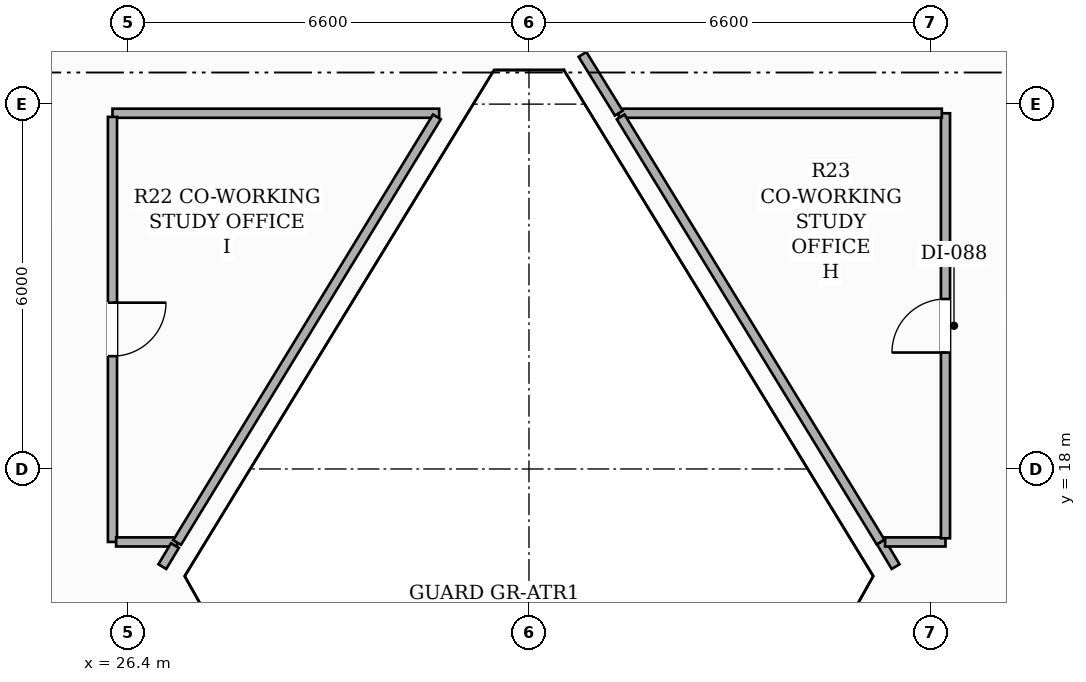
"""IFC4 building model, lengths in metres.
Left out: names, types, materials, properties, quantities, classifications, styles, units other than length and angle.
Written with IfcOpenShell. Run it as: python <this file> out.ifc"""

import sys

from ifc_helpers import new_model, si_unit, direction, frame, frame_2d, origin, place, context, subcontext, project, spatial, rectangle, extrude, element, fill, save


model = new_model("IFC4")
c1 = context("Model", 3, precision=1e-05, world=origin(), true_north=direction((0.0, 1.0)))
c2 = subcontext(c1, "Body", "Model", "MODEL_VIEW")
j1 = project(units=[si_unit("LENGTHUNIT", "METRE"), si_unit("PLANEANGLEUNIT", "RADIAN")], contexts=[c1])
p1 = place(None, origin())
s1 = spatial("IfcSite", under=j1, at=p1, CompositionType="ELEMENT")
p2 = place(p1, origin())
s2 = spatial("IfcBuilding", under=s1, at=p2, CompositionType="ELEMENT")
p3 = place(p2, frame((0.0, 0.0, 30.2)))
s3 = spatial("IfcBuildingStorey", under=s2, at=p3, CompositionType="ELEMENT", Elevation=30.2)
p4 = place(p3, frame((31.523, 23.85, 0.0), z_axis=(0.0, 0.0, 1.0), x_axis=(-1.0, 0.0, 0.0)))
e1 = element("IfcWall", 1, at=p4, inside=s3, PredefinedType="PARTITIONING", context=c2, shape_type="SweptSolid", body=[
    extrude(rectangle(XDim=5.373, YDim=0.15, at=frame_2d((2.687, 0.0))), origin(), (0.0, 0.0, 1.0), 2.669),
])
p5 = place(p3, frame((26.15, 23.79, 0.0), z_axis=(0.0, 0.0, 1.0), x_axis=(0.0, -1.0, 0.0)))
e2 = element("IfcWall", 2, at=p5, inside=s3, PredefinedType="PARTITIONING", context=c2, shape_type="SweptSolid", body=[
    extrude(rectangle(XDim=6.99, YDim=0.15, at=frame_2d((3.495, 0.0))), origin(), (0.0, 0.0, 1.0), 2.669),
])
p6 = place(p5, frame((3.055, 0.0, 0.0)))
e3 = element("IfcOpeningElement", 3, at=p6, cuts=e2, PredefinedType="OPENING", context=c2, shape_type="SweptSolid", body=[
    extrude(rectangle(XDim=0.88, YDim=2.1, at=frame_2d((0.44, 1.05))), frame((0.0, 0.085, 0.0), z_axis=(0.0, -1.0, 0.0), x_axis=(1.0, 0.0, 0.0)), (0.0, 0.0, 1.0), 0.17),
])
p7 = place(p3, frame((26.21, 16.8, 0.0), z_axis=(0.0, 0.0, 1.0), x_axis=(1.0, 0.0, 0.0)))
e4 = element("IfcWall", 4, at=p7, inside=s3, PredefinedType="PARTITIONING", context=c2, shape_type="SweptSolid", body=[
    extrude(rectangle(XDim=1.003, YDim=0.15, at=frame_2d((0.501, 0.0))), origin(), (0.0, 0.0, 1.0), 3.06),
])
p8 = place(p3, frame((27.177, 16.74, 0.0), z_axis=(0.0, 0.0, 1.0), x_axis=(-0.513515835534, -0.858080116688, 0.0)))
e5 = element("IfcWall", 5, at=p8, inside=s3, PredefinedType="PARTITIONING", context=c2, shape_type="SweptSolid", body=[
    extrude(rectangle(XDim=0.403, YDim=0.15, at=frame_2d((0.202, 0.0))), origin(), (0.0, 0.0, 1.0), 3.06),
])
p9 = place(p3, frame((39.03, 16.394, 0.0), z_axis=(0.0, 0.0, 1.0), x_axis=(-0.51343298076, 0.858129695482, 0.0)))
e6 = element("IfcWall", 6, at=p9, inside=s3, PredefinedType="PARTITIONING", context=c2, shape_type="SweptSolid", body=[
    extrude(rectangle(XDim=0.473, YDim=0.15, at=frame_2d((0.237, 0.0))), origin(), (0.0, 0.0, 1.0), 3.06),
])
p10 = place(p3, frame((38.857, 16.8, 0.0), z_axis=(0.0, 0.0, 1.0), x_axis=(1.0, 0.0, 0.0)))
e7 = element("IfcWall", 7, at=p10, inside=s3, PredefinedType="PARTITIONING", context=c2, shape_type="SweptSolid", body=[
    extrude(rectangle(XDim=0.993, YDim=0.15, at=frame_2d((0.497, 0.0))), origin(), (0.0, 0.0, 1.0), 3.06),
])
p11 = place(p3, frame((39.85, 16.86, 0.0), z_axis=(0.0, 0.0, 1.0), x_axis=(0.0, 1.0, 0.0)))
e8 = element("IfcWall", 8, at=p11, inside=s3, PredefinedType="PARTITIONING", context=c2, shape_type="SweptSolid", body=[
    extrude(rectangle(XDim=6.99, YDim=0.15, at=frame_2d((3.495, 0.0))), origin(), (0.0, 0.0, 1.0), 2.669),
])
p12 = place(p11, frame((3.055, 0.0, 0.0)))
e9 = element("IfcOpeningElement", 9, at=p12, cuts=e8, PredefinedType="OPENING", context=c2, shape_type="SweptSolid", body=[
    extrude(rectangle(XDim=0.88, YDim=2.1, at=frame_2d((0.44, 1.05))), frame((0.0, 0.085, 0.0), z_axis=(0.0, -1.0, 0.0), x_axis=(1.0, 0.0, 0.0)), (0.0, 0.0, 1.0), 0.17),
])
p13 = place(p3, frame((39.79, 23.85, 0.0), z_axis=(0.0, 0.0, 1.0), x_axis=(-1.0, 0.0, 0.0)))
e10 = element("IfcWall", 10, at=p13, inside=s3, PredefinedType="PARTITIONING", context=c2, shape_type="SweptSolid", body=[
    extrude(rectangle(XDim=5.313, YDim=0.15, at=frame_2d((2.656, 0.0))), origin(), (0.0, 0.0, 1.0), 2.669),
])
p14 = place(p3, frame((34.477, 23.851, 0.0), z_axis=(0.0, 0.0, 1.0), x_axis=(-0.52541513414, 0.8508460124, 0.0)))
e11 = element("IfcWall", 11, at=p14, inside=s3, PredefinedType="PARTITIONING", context=c2, shape_type="SweptSolid", body=[
    extrude(rectangle(XDim=1.136, YDim=0.15, at=frame_2d((0.568, 0.0))), origin(), (0.0, 0.0, 1.0), 3.06),
])
p15 = place(p3, frame((27.213, 16.791, 0.0), z_axis=(0.0, 0.0, 1.0), x_axis=(0.521095914239, 0.853498124288, 0.0)))
e12 = element("IfcWall", 12, at=p15, inside=s3, PredefinedType="PARTITIONING", context=c2, shape_type="SweptSolid", body=[
    extrude(rectangle(XDim=8.2, YDim=0.15, at=frame_2d((4.1, 0.0))), origin(), (0.0, 0.0, 1.0), 2.669),
])
p16 = place(p3, frame((34.508, 23.79, 0.0), z_axis=(0.0, 0.0, 1.0), x_axis=(0.52163195406, -0.853170618636, 0.0)))
e13 = element("IfcWall", 13, at=p16, inside=s3, PredefinedType="PARTITIONING", context=c2, shape_type="SweptSolid", body=[
    extrude(rectangle(XDim=8.195, YDim=0.15, at=frame_2d((4.098, 0.0))), origin(), (0.0, 0.0, 1.0), 2.669),
])
p17 = place(p12, origin())
e14 = element("IfcDoor", 14, at=p17, inside=s3, OperationType="SINGLE_SWING_LEFT", PredefinedType="DOOR", context=c2, shape_type="SweptSolid", body=[
    extrude(rectangle(XDim=0.88, YDim=2.1, at=frame_2d((0.44, 1.05))), frame((0.0, 0.025, 0.0), z_axis=(0.0, -1.0, 0.0), x_axis=(1.0, 0.0, 0.0)), (0.0, 0.0, 1.0), 0.05),
])
fill(e9, e14)
p18 = place(p6, origin())
e15 = element("IfcDoor", 15, at=p18, inside=s3, OperationType="SINGLE_SWING_LEFT", PredefinedType="DOOR", context=c2, shape_type="SweptSolid", body=[
    extrude(rectangle(XDim=0.88, YDim=2.1, at=frame_2d((0.44, 1.05))), frame((0.0, 0.025, 0.0), z_axis=(0.0, -1.0, 0.0), x_axis=(1.0, 0.0, 0.0)), (0.0, 0.0, 1.0), 0.05),
])
fill(e3, e15)
save(model, sys.argv[1])
